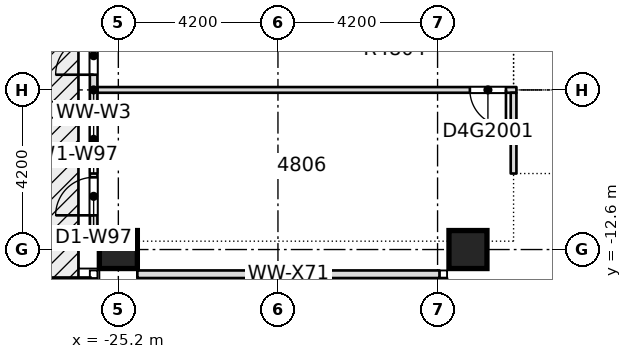
"""IFC4 building model, lengths in metres.
Left out: names, types, materials, properties, quantities, classifications, styles, units other than length and angle.
Written with IfcOpenShell. Run it as: python <this file> out.ifc"""

import sys

from ifc_helpers import new_model, si_unit, direction, frame, frame_2d, origin, origin_2d, place, context, subcontext, project, spatial, rectangle, extrude, element, fill, save


model = new_model("IFC4")
c1 = context("Model", 3, precision=1e-05, world=origin(), true_north=direction((0.0, 1.0)))
c2 = subcontext(c1, "Body", "Model", "MODEL_VIEW")
j1 = project(units=[si_unit("LENGTHUNIT", "METRE"), si_unit("PLANEANGLEUNIT", "RADIAN")], contexts=[c1])
p1 = place(None, origin())
s1 = spatial("IfcSite", under=j1, at=p1, CompositionType="ELEMENT")
p2 = place(p1, origin())
s2 = spatial("IfcBuilding", under=s1, at=p2, CompositionType="ELEMENT")
p3 = place(p2, frame((0.0, 0.0, 185.9)))
s3 = spatial("IfcBuildingStorey", under=s2, at=p3, CompositionType="ELEMENT", Elevation=185.9)
for number, where, z_axis, x_axis in (
    (1, (-25.2, -12.6, -0.4), (0.0, 0.0, 1.0), (1.0, 0.0, 0.0)),
    (2, (-16.0, -12.6, -0.4), (0.0, 0.0, 1.0), (1.0, 0.0, 0.0)),
):
    element("IfcColumn", number, at=place(p3, frame(where, z_axis=z_axis, x_axis=x_axis)), inside=s3, PredefinedType="COLUMN", context=c2, shape_type="SweptSolid", body=[
        extrude(rectangle(XDim=1.0, YDim=1.0, at=origin_2d()), origin(), (0.0, 0.0, 1.0), 3.45),
    ])
p4 = place(p3, frame((-25.75, -8.4, 0.0), z_axis=(0.0, 0.0, 1.0), x_axis=(1.0, 0.0, 0.0)))
e3 = element("IfcWall", 3, at=p4, inside=s3, PredefinedType="PARTITIONING", context=c2, shape_type="SweptSolid", body=[
    extrude(rectangle(XDim=11.025, YDim=0.15, at=frame_2d((5.512, 0.0))), origin(), (0.0, 0.0, 1.0), 3.05),
])
p5 = place(p4, frame((9.8, 0.0, 0.0)))
e4 = element("IfcOpeningElement", 4, at=p5, cuts=e3, PredefinedType="OPENING", context=c2, shape_type="SweptSolid", body=[
    extrude(rectangle(XDim=0.95, YDim=2.1, at=frame_2d((0.475, 1.05))), frame((0.0, 0.085, 0.0), z_axis=(0.0, -1.0, 0.0), x_axis=(1.0, 0.0, 0.0)), (0.0, 0.0, 1.0), 0.17),
])
p6 = place(p3, frame((-14.8, -10.6, 0.0), z_axis=(0.0, 0.0, 1.0), x_axis=(0.0, 1.0, 0.0)))
e5 = element("IfcWall", 5, at=p6, inside=s3, PredefinedType="PARTITIONING", context=c2, shape_type="SweptSolid", body=[
    extrude(rectangle(XDim=2.125, YDim=0.15, at=frame_2d((1.062, 0.0))), origin(), (0.0, 0.0, 1.0), 3.05),
])
p7 = place(p3, frame((-25.85, -4.7, 0.0), z_axis=(0.0, 0.0, 1.0), x_axis=(0.0, -1.0, 0.0)))
e6 = element("IfcWall", 6, at=p7, inside=s3, PredefinedType="STANDARD", context=c2, shape_type="SweptSolid", body=[
    extrude(rectangle(XDim=7.4, YDim=0.2, at=frame_2d((3.7, 0.0))), origin(), (0.0, 0.0, 1.0), 3.05),
])
p8 = place(p7, frame((4.1, 0.0, 0.2)))
e7 = element("IfcOpeningElement", 7, at=p8, cuts=e6, PredefinedType="OPENING", context=c2, shape_type="SweptSolid", body=[
    extrude(rectangle(XDim=1.8, YDim=2.65, at=frame_2d((0.9, 1.325))), frame((0.0, 0.11, 0.0), z_axis=(0.0, -1.0, 0.0), x_axis=(1.0, 0.0, 0.0)), (0.0, 0.0, 1.0), 0.22),
])
p9 = place(p7, frame((6.0, 0.0, 0.0)))
e8 = element("IfcOpeningElement", 8, at=p9, cuts=e6, PredefinedType="OPENING", context=c2, shape_type="SweptSolid", body=[
    extrude(rectangle(XDim=1.0, YDim=2.4, at=frame_2d((0.5, 1.2))), frame((0.0, 0.11, 0.0), z_axis=(0.0, -1.0, 0.0), x_axis=(1.0, 0.0, 0.0)), (0.0, 0.0, 1.0), 0.22),
])
p10 = place(p7, frame((2.3, 0.0, 0.0)))
e9 = element("IfcOpeningElement", 9, at=p10, cuts=e6, PredefinedType="OPENING", context=c2, shape_type="SweptSolid", body=[
    extrude(rectangle(XDim=1.0, YDim=2.4, at=frame_2d((0.5, 1.2))), frame((0.0, 0.11, 0.0), z_axis=(0.0, -1.0, 0.0), x_axis=(1.0, 0.0, 0.0)), (0.0, 0.0, 1.0), 0.22),
])
p11 = place(p3, frame((-24.7, -13.25, 0.0), z_axis=(0.0, 0.0, 1.0), x_axis=(1.0, 0.0, 0.0)))
e10 = element("IfcWall", 10, at=p11, inside=s3, PredefinedType="STANDARD", context=c2, shape_type="SweptSolid", body=[
    extrude(rectangle(XDim=7.95, YDim=0.2, at=frame_2d((3.975, 0.0))), origin(), (0.0, 0.0, 1.0), 3.05),
])
p12 = place(p3, frame((-16.65, -13.35, 0.0), z_axis=(0.0, 0.0, 1.0), x_axis=(0.0, -1.0, 0.0)))
e11 = element("IfcWall", 11, at=p12, inside=s3, PredefinedType="STANDARD", context=c2, shape_type="SweptSolid", body=[
    extrude(rectangle(XDim=7.15, YDim=0.2, at=frame_2d((3.575, 0.0))), origin(), (0.0, 0.0, 1.0), 3.05),
])
p13 = place(p12, frame((3.85, 0.0, 0.2)))
e12 = element("IfcOpeningElement", 12, at=p13, cuts=e11, PredefinedType="OPENING", context=c2, shape_type="SweptSolid", body=[
    extrude(rectangle(XDim=1.8, YDim=2.65, at=frame_2d((0.9, 1.325))), frame((0.0, 0.11, 0.0), z_axis=(0.0, -1.0, 0.0), x_axis=(1.0, 0.0, 0.0)), (0.0, 0.0, 1.0), 0.22),
])
p14 = place(p12, frame((0.275, 0.0, 0.2)))
e13 = element("IfcOpeningElement", 13, at=p14, cuts=e11, PredefinedType="OPENING", context=c2, shape_type="SweptSolid", body=[
    extrude(rectangle(XDim=1.8, YDim=2.65, at=frame_2d((0.9, 1.325))), frame((0.0, 0.11, 0.0), z_axis=(0.0, -1.0, 0.0), x_axis=(1.0, 0.0, 0.0)), (0.0, 0.0, 1.0), 0.22),
])
p15 = place(p5, origin())
e14 = element("IfcDoor", 14, at=p15, inside=s3, OperationType="SINGLE_SWING_RIGHT", PredefinedType="DOOR", context=c2, shape_type="SweptSolid", body=[
    extrude(rectangle(XDim=0.95, YDim=2.1, at=frame_2d((0.475, 1.05))), frame((0.0, 0.025, 0.0), z_axis=(0.0, -1.0, 0.0), x_axis=(1.0, 0.0, 0.0)), (0.0, 0.0, 1.0), 0.05),
])
fill(e4, e14)
p16 = place(p8, origin())
e15 = element("IfcWindow", 15, at=p16, inside=s3, PartitioningType="SINGLE_PANEL", PredefinedType="WINDOW", context=c2, shape_type="SweptSolid", body=[
    extrude(rectangle(XDim=1.8, YDim=2.65, at=frame_2d((0.9, 1.325))), frame((0.0, 0.03, 0.0), z_axis=(0.0, -1.0, 0.0), x_axis=(1.0, 0.0, 0.0)), (0.0, 0.0, 1.0), 0.06),
])
fill(e7, e15)
p17 = place(p9, origin())
e16 = element("IfcDoor", 16, at=p17, inside=s3, OperationType="SINGLE_SWING_LEFT", PredefinedType="DOOR", context=c2, shape_type="SweptSolid", body=[
    extrude(rectangle(XDim=1.0, YDim=2.4, at=frame_2d((0.5, 1.2))), frame((0.0, 0.025, 0.0), z_axis=(0.0, -1.0, 0.0), x_axis=(1.0, 0.0, 0.0)), (0.0, 0.0, 1.0), 0.05),
])
fill(e8, e16)
p18 = place(p10, origin())
e17 = element("IfcDoor", 17, at=p18, inside=s3, OperationType="SINGLE_SWING_LEFT", PredefinedType="DOOR", context=c2, shape_type="SweptSolid", body=[
    extrude(rectangle(XDim=1.0, YDim=2.4, at=frame_2d((0.5, 1.2))), frame((0.0, 0.025, 0.0), z_axis=(0.0, -1.0, 0.0), x_axis=(1.0, 0.0, 0.0)), (0.0, 0.0, 1.0), 0.05),
])
fill(e9, e17)
save(model, sys.argv[1])
